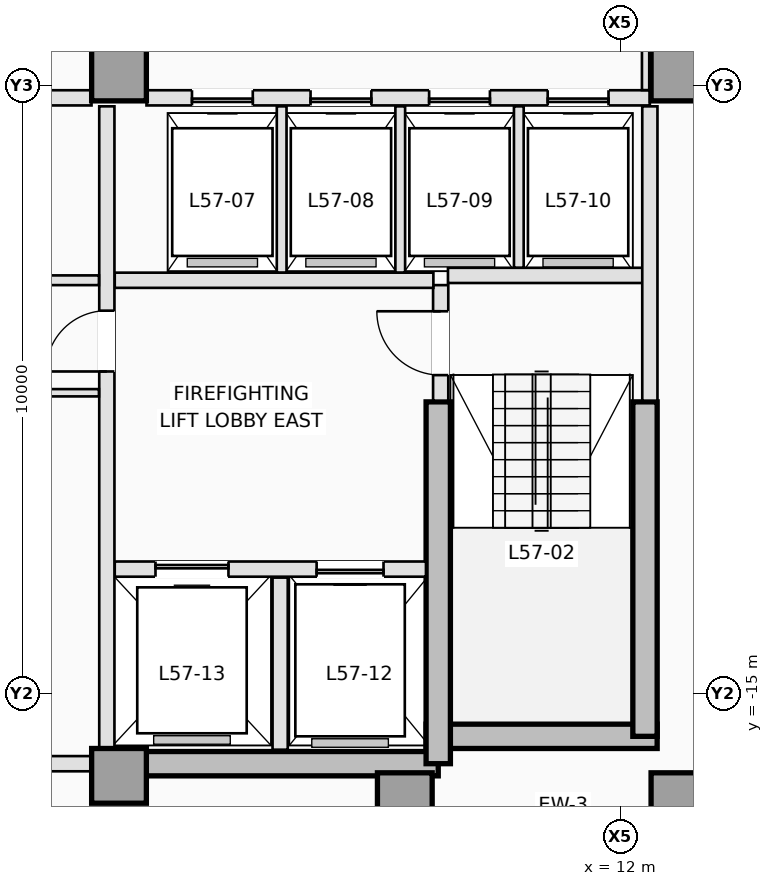
"""IFC4 building model, lengths in metres.
Left out: names, types, materials, properties, quantities, classifications, styles, units other than length and angle.
Written with IfcOpenShell. Run it as: python <this file> out.ifc"""

import sys

from ifc_helpers import new_model, si_unit, direction, frame, frame_2d, origin, origin_2d, place, context, subcontext, project, spatial, rectangle, extrude, element, fill, save


model = new_model("IFC4")
c1 = context("Model", 3, precision=1e-05, world=origin(), true_north=direction((0.0, 1.0)))
c2 = subcontext(c1, "Body", "Model", "MODEL_VIEW")
j1 = project(units=[si_unit("LENGTHUNIT", "METRE"), si_unit("PLANEANGLEUNIT", "RADIAN")], contexts=[c1])
p1 = place(None, origin())
s1 = spatial("IfcSite", under=j1, at=p1, CompositionType="ELEMENT")
p2 = place(p1, origin())
s2 = spatial("IfcBuilding", under=s1, at=p2, CompositionType="ELEMENT")
p3 = place(p2, frame((0.0, 0.0, 207.9)))
s3 = spatial("IfcBuildingStorey", under=s2, at=p3, CompositionType="ELEMENT", Elevation=207.9)
p4 = place(p3, frame((3.75, -16.15, 0.0), z_axis=(0.0, 0.0, 1.0), x_axis=(1.0, 0.0, 0.0)))
e1 = element("IfcWall", 1, at=p4, inside=s3, PredefinedType="SHEAR", context=c2, shape_type="SweptSolid", body=[
    extrude(rectangle(XDim=5.25, YDim=0.4, at=frame_2d((2.625, 0.0))), origin(), (0.0, 0.0, 1.0), 3.5),
])
p5 = place(p3, frame((8.8, -15.7, 0.0), z_axis=(0.0, 0.0, 1.0), x_axis=(1.0, 0.0, 0.0)))
e2 = element("IfcWall", 2, at=p5, inside=s3, PredefinedType="SHEAR", context=c2, shape_type="SweptSolid", body=[
    extrude(rectangle(XDim=3.8, YDim=0.4, at=frame_2d((1.9, 0.0))), origin(), (0.0, 0.0, 1.0), 3.5),
])
p6 = place(p3, frame((12.4, -15.7, 0.0), z_axis=(0.0, 0.0, 1.0), x_axis=(0.0, 1.0, 0.0)))
e3 = element("IfcWall", 3, at=p6, inside=s3, PredefinedType="SHEAR", context=c2, shape_type="SweptSolid", body=[
    extrude(rectangle(XDim=5.5, YDim=0.4, at=frame_2d((2.75, 0.0))), origin(), (0.0, 0.0, 1.0), 3.5),
])
p7 = place(p3, frame((9.0, -16.15, 0.0), z_axis=(0.0, 0.0, 1.0), x_axis=(0.0, 1.0, 0.0)))
e4 = element("IfcWall", 4, at=p7, inside=s3, PredefinedType="SHEAR", context=c2, shape_type="SweptSolid", body=[
    extrude(rectangle(XDim=5.95, YDim=0.4, at=frame_2d((2.975, 0.0))), origin(), (0.0, 0.0, 1.0), 3.5),
])
for number, where, z_axis, x_axis in (
    (5, (3.75, -16.35, 0.0), (0.0, 0.0, 1.0), (1.0, 0.0, 0.0)),
    (6, (8.45, -16.75, 0.0), (0.0, 0.0, 1.0), (1.0, 0.0, 0.0)),
    (7, (12.95, -16.75, 0.0), (0.0, 0.0, 1.0), (1.0, 0.0, 0.0)),
    (8, (3.75, -4.8, 0.0), (0.0, 0.0, 1.0), (1.0, 0.0, 0.0)),
    (9, (12.95, -4.8, 0.0), (0.0, 0.0, 1.0), (1.0, 0.0, 0.0)),
):
    element("IfcColumn", number, at=place(p3, frame(where, z_axis=z_axis, x_axis=x_axis)), inside=s3, PredefinedType="COLUMN", context=c2, shape_type="SweptSolid", body=[
        extrude(rectangle(XDim=0.9, YDim=0.9, at=origin_2d()), origin(), (0.0, 0.0, 1.0), 3.5),
    ])
p8 = place(p3, frame((9.04, -10.18, 0.0), z_axis=(0.0, 0.0, 1.0), x_axis=(0.0, 1.0, 0.0)))
e10 = element("IfcWall", 10, at=p8, inside=s3, PredefinedType="PARTITIONING", context=c2, shape_type="SweptSolid", body=[
    extrude(rectangle(XDim=1.9, YDim=0.25, at=frame_2d((0.95, 0.0))), origin(), (0.0, 0.0, 1.0), 3.25),
])
p9 = place(p8, frame((0.42, 0.0, 0.0)))
e11 = element("IfcOpeningElement", 11, at=p9, cuts=e10, PredefinedType="OPENING", context=c2, shape_type="SweptSolid", body=[
    extrude(rectangle(XDim=1.05, YDim=2.15, at=frame_2d((0.525, 1.075))), frame((0.0, 0.135, 0.0), z_axis=(0.0, -1.0, 0.0), x_axis=(1.0, 0.0, 0.0)), (0.0, 0.0, 1.0), 0.27),
])
p10 = place(p3, frame((9.16, -8.12, 0.0), z_axis=(0.0, 0.0, 1.0), x_axis=(1.0, 0.0, 0.0)))
e12 = element("IfcWall", 12, at=p10, inside=s3, PredefinedType="PARTITIONING", context=c2, shape_type="SweptSolid", body=[
    extrude(rectangle(XDim=3.22, YDim=0.25, at=frame_2d((1.61, 0.0))), origin(), (0.0, 0.0, 1.0), 3.25),
])
p11 = place(p3, frame((12.48, -10.18, 0.0), z_axis=(0.0, 0.0, 1.0), x_axis=(0.0, 1.0, 0.0)))
e13 = element("IfcWall", 13, at=p11, inside=s3, PredefinedType="PARTITIONING", context=c2, shape_type="SweptSolid", body=[
    extrude(rectangle(XDim=4.84, YDim=0.25, at=frame_2d((2.42, 0.0))), origin(), (0.0, 0.0, 1.0), 3.25),
])
p12 = place(p3, frame((3.68, -12.95, 0.0), z_axis=(0.0, 0.0, 1.0), x_axis=(1.0, 0.0, 0.0)))
e14 = element("IfcWall", 14, at=p12, inside=s3, PredefinedType="PARTITIONING", context=c2, shape_type="SweptSolid", body=[
    extrude(rectangle(XDim=5.118, YDim=0.25, at=frame_2d((2.559, 0.0))), origin(), (0.0, 0.0, 1.0), 3.25),
])
p13 = place(p12, frame((3.32, 0.0, 0.0)))
e15 = element("IfcOpeningElement", 15, at=p13, cuts=e14, PredefinedType="OPENING", context=c2, shape_type="SweptSolid", body=[
    extrude(rectangle(XDim=1.1, YDim=2.15, at=frame_2d((0.55, 1.075))), frame((0.0, 0.135, 0.0), z_axis=(0.0, -1.0, 0.0), x_axis=(1.0, 0.0, 0.0)), (0.0, 0.0, 1.0), 0.27),
])
p14 = place(p12, frame((0.67, 0.0, 0.0)))
e16 = element("IfcOpeningElement", 16, at=p14, cuts=e14, PredefinedType="OPENING", context=c2, shape_type="SweptSolid", body=[
    extrude(rectangle(XDim=1.2, YDim=2.15, at=frame_2d((0.6, 1.075))), frame((0.0, 0.135, 0.0), z_axis=(0.0, -1.0, 0.0), x_axis=(1.0, 0.0, 0.0)), (0.0, 0.0, 1.0), 0.27),
])
p15 = place(p3, frame((6.4, -15.92, 0.0), z_axis=(0.0, 0.0, 1.0), x_axis=(0.0, 1.0, 0.0)))
e17 = element("IfcWall", 17, at=p15, inside=s3, PredefinedType="PARTITIONING", context=c2, shape_type="SweptSolid", body=[
    extrude(rectangle(XDim=2.83, YDim=0.25, at=frame_2d((1.415, 0.0))), origin(), (0.0, 0.0, 1.0), 3.25),
])
p16 = place(p3, frame((3.68, -8.2, 0.0), z_axis=(0.0, 0.0, 1.0), x_axis=(1.0, 0.0, 0.0)))
e18 = element("IfcWall", 18, at=p16, inside=s3, PredefinedType="PARTITIONING", context=c2, shape_type="SweptSolid", body=[
    extrude(rectangle(XDim=5.24, YDim=0.25, at=frame_2d((2.62, 0.0))), origin(), (0.0, 0.0, 1.0), 3.25),
])
p17 = place(p3, frame((3.55, -15.898, 0.0), z_axis=(0.0, 0.0, 1.0), x_axis=(0.0, 1.0, 0.0)))
e19 = element("IfcWall", 19, at=p17, inside=s3, PredefinedType="PARTITIONING", context=c2, shape_type="SweptSolid", body=[
    extrude(rectangle(XDim=10.558, YDim=0.25, at=frame_2d((5.279, 0.0))), origin(), (0.0, 0.0, 1.0), 3.25),
])
p18 = place(p17, frame((6.198, 0.0, 0.0)))
e20 = element("IfcOpeningElement", 20, at=p18, cuts=e19, PredefinedType="OPENING", context=c2, shape_type="SweptSolid", body=[
    extrude(rectangle(XDim=1.0, YDim=2.15, at=frame_2d((0.5, 1.075))), frame((0.0, 0.135, 0.0), z_axis=(0.0, -1.0, 0.0), x_axis=(1.0, 0.0, 0.0)), (0.0, 0.0, 1.0), 0.27),
])
p19 = place(p3, frame((4.202, -5.2, 0.0), z_axis=(0.0, 0.0, 1.0), x_axis=(1.0, 0.0, 0.0)))
e21 = element("IfcWall", 21, at=p19, inside=s3, PredefinedType="PARTITIONING", context=c2, shape_type="SweptSolid", body=[
    extrude(rectangle(XDim=8.278, YDim=0.25, at=frame_2d((4.139, 0.0))), origin(), (0.0, 0.0, 1.0), 3.25),
])
p20 = place(p19, frame((0.748, 0.0, 0.0)))
e22 = element("IfcOpeningElement", 22, at=p20, cuts=e21, PredefinedType="OPENING", context=c2, shape_type="SweptSolid", body=[
    extrude(rectangle(XDim=1.0, YDim=2.15, at=frame_2d((0.5, 1.075))), frame((0.0, 0.135, 0.0), z_axis=(0.0, -1.0, 0.0), x_axis=(1.0, 0.0, 0.0)), (0.0, 0.0, 1.0), 0.27),
])
p21 = place(p19, frame((2.698, 0.0, 0.0)))
e23 = element("IfcOpeningElement", 23, at=p21, cuts=e21, PredefinedType="OPENING", context=c2, shape_type="SweptSolid", body=[
    extrude(rectangle(XDim=1.0, YDim=2.15, at=frame_2d((0.5, 1.075))), frame((0.0, 0.135, 0.0), z_axis=(0.0, -1.0, 0.0), x_axis=(1.0, 0.0, 0.0)), (0.0, 0.0, 1.0), 0.27),
])
p22 = place(p19, frame((4.648, 0.0, 0.0)))
e24 = element("IfcOpeningElement", 24, at=p22, cuts=e21, PredefinedType="OPENING", context=c2, shape_type="SweptSolid", body=[
    extrude(rectangle(XDim=1.0, YDim=2.15, at=frame_2d((0.5, 1.075))), frame((0.0, 0.135, 0.0), z_axis=(0.0, -1.0, 0.0), x_axis=(1.0, 0.0, 0.0)), (0.0, 0.0, 1.0), 0.27),
])
p23 = place(p19, frame((6.598, 0.0, 0.0)))
e25 = element("IfcOpeningElement", 25, at=p23, cuts=e21, PredefinedType="OPENING", context=c2, shape_type="SweptSolid", body=[
    extrude(rectangle(XDim=1.0, YDim=2.15, at=frame_2d((0.5, 1.075))), frame((0.0, 0.135, 0.0), z_axis=(0.0, -1.0, 0.0), x_axis=(1.0, 0.0, 0.0)), (0.0, 0.0, 1.0), 0.27),
])
p24 = place(p3, frame((0.95, -5.2, 0.0), z_axis=(0.0, 0.0, 1.0), x_axis=(1.0, 0.0, 0.0)))
e26 = element("IfcWall", 26, at=p24, inside=s3, PredefinedType="PARTITIONING", context=c2, shape_type="SweptSolid", body=[
    extrude(rectangle(XDim=2.348, YDim=0.25, at=frame_2d((1.174, 0.0))), origin(), (0.0, 0.0, 1.0), 3.25),
])
for number, where, z_axis, x_axis in (
    (27, (6.425, -8.073, 0.0), (0.0, 0.0, 1.0), (0.0, 1.0, 0.0)),
    (28, (8.375, -8.073, 0.0), (0.0, 0.0, 1.0), (0.0, 1.0, 0.0)),
):
    element("IfcWall", number, at=place(p3, frame(where, z_axis=z_axis, x_axis=x_axis)), inside=s3, PredefinedType="PARTITIONING", context=c2, shape_type="SweptSolid", body=[
        extrude(rectangle(XDim=2.733, YDim=0.16, at=frame_2d((1.366, 0.0))), origin(), (0.0, 0.0, 1.0), 3.25),
    ])
p25 = place(p3, frame((10.325, -7.993, 0.0), z_axis=(0.0, 0.0, 1.0), x_axis=(0.0, 1.0, 0.0)))
e29 = element("IfcWall", 29, at=p25, inside=s3, PredefinedType="PARTITIONING", context=c2, shape_type="SweptSolid", body=[
    extrude(rectangle(XDim=2.653, YDim=0.16, at=frame_2d((1.326, 0.0))), origin(), (0.0, 0.0, 1.0), 3.25),
])
p26 = place(p3, frame((-3.298, -16.15, 0.0), z_axis=(0.0, 0.0, 1.0), x_axis=(1.0, 0.0, 0.0)))
e30 = element("IfcWall", 30, at=p26, inside=s3, PredefinedType="PARTITIONING", context=c2, shape_type="SweptSolid", body=[
    extrude(rectangle(XDim=6.596, YDim=0.25, at=frame_2d((3.298, 0.0))), origin(), (0.0, 0.0, 1.0), 2.45),
])
p27 = place(p3, frame((-3.42, -8.2, 0.0), z_axis=(0.0, 0.0, 1.0), x_axis=(1.0, 0.0, 0.0)))
e31 = element("IfcWall", 31, at=p27, inside=s3, PredefinedType="PARTITIONING", context=c2, shape_type="SweptSolid", body=[
    extrude(rectangle(XDim=6.84, YDim=0.16, at=frame_2d((3.42, 0.0))), origin(), (0.0, 0.0, 1.0), 3.25),
])
p28 = place(p27, frame((2.92, 0.0, 0.0)))
e32 = element("IfcOpeningElement", 32, at=p28, cuts=e31, PredefinedType="OPENING", context=c2, shape_type="SweptSolid", body=[
    extrude(rectangle(XDim=1.0, YDim=2.15, at=frame_2d((0.5, 1.075))), frame((0.0, 0.09, 0.0), z_axis=(0.0, -1.0, 0.0), x_axis=(1.0, 0.0, 0.0)), (0.0, 0.0, 1.0), 0.18),
])
p29 = place(p3, frame((-3.42, -10.05, 0.0), z_axis=(0.0, 0.0, 1.0), x_axis=(1.0, 0.0, 0.0)))
e33 = element("IfcWall", 33, at=p29, inside=s3, PredefinedType="PARTITIONING", context=c2, shape_type="SweptSolid", body=[
    extrude(rectangle(XDim=6.84, YDim=0.12, at=frame_2d((3.42, 0.0))), origin(), (0.0, 0.0, 1.0), 3.25),
])
p30 = place(p29, frame((0.45, 0.0, 0.0)))
e34 = element("IfcOpeningElement", 34, at=p30, cuts=e33, PredefinedType="OPENING", context=c2, shape_type="SweptSolid", body=[
    extrude(rectangle(XDim=0.88, YDim=2.12, at=frame_2d((0.44, 1.06))), frame((0.0, 0.07, 0.0), z_axis=(0.0, -1.0, 0.0), x_axis=(1.0, 0.0, 0.0)), (0.0, 0.0, 1.0), 0.14),
])
p31 = place(p29, frame((3.6, 0.0, 0.0)))
e35 = element("IfcOpeningElement", 35, at=p31, cuts=e33, PredefinedType="OPENING", context=c2, shape_type="SweptSolid", body=[
    extrude(rectangle(XDim=0.92, YDim=2.12, at=frame_2d((0.46, 1.06))), frame((0.0, 0.07, 0.0), z_axis=(0.0, -1.0, 0.0), x_axis=(1.0, 0.0, 0.0)), (0.0, 0.0, 1.0), 0.14),
])
p32 = place(p3, frame((12.41, -2.462, 0.0), z_axis=(0.0, 0.0, 1.0), x_axis=(0.0, -1.0, 0.0)))
e36 = element("IfcWall", 36, at=p32, inside=s3, PredefinedType="PARTITIONING", context=c2, shape_type="SweptSolid", body=[
    extrude(rectangle(XDim=2.611, YDim=0.12, at=frame_2d((1.306, 0.0))), origin(), (0.0, 0.0, 1.0), 3.25),
])
p33 = place(p20, origin())
e37 = element("IfcDoor", 37, at=p33, inside=s3, OperationType="SLIDING_TO_RIGHT", PredefinedType="DOOR", context=c2, shape_type="SweptSolid", body=[
    extrude(rectangle(XDim=1.0, YDim=2.15, at=frame_2d((0.5, 1.075))), frame((0.0, 0.025, 0.0), z_axis=(0.0, -1.0, 0.0), x_axis=(1.0, 0.0, 0.0)), (0.0, 0.0, 1.0), 0.05),
])
fill(e22, e37)
p34 = place(p21, origin())
e38 = element("IfcDoor", 38, at=p34, inside=s3, OperationType="SLIDING_TO_RIGHT", PredefinedType="DOOR", context=c2, shape_type="SweptSolid", body=[
    extrude(rectangle(XDim=1.0, YDim=2.15, at=frame_2d((0.5, 1.075))), frame((0.0, 0.025, 0.0), z_axis=(0.0, -1.0, 0.0), x_axis=(1.0, 0.0, 0.0)), (0.0, 0.0, 1.0), 0.05),
])
fill(e23, e38)
p35 = place(p22, origin())
e39 = element("IfcDoor", 39, at=p35, inside=s3, OperationType="SLIDING_TO_RIGHT", PredefinedType="DOOR", context=c2, shape_type="SweptSolid", body=[
    extrude(rectangle(XDim=1.0, YDim=2.15, at=frame_2d((0.5, 1.075))), frame((0.0, 0.025, 0.0), z_axis=(0.0, -1.0, 0.0), x_axis=(1.0, 0.0, 0.0)), (0.0, 0.0, 1.0), 0.05),
])
fill(e24, e39)
p36 = place(p23, origin())
e40 = element("IfcDoor", 40, at=p36, inside=s3, OperationType="SLIDING_TO_RIGHT", PredefinedType="DOOR", context=c2, shape_type="SweptSolid", body=[
    extrude(rectangle(XDim=1.0, YDim=2.15, at=frame_2d((0.5, 1.075))), frame((0.0, 0.025, 0.0), z_axis=(0.0, -1.0, 0.0), x_axis=(1.0, 0.0, 0.0)), (0.0, 0.0, 1.0), 0.05),
])
fill(e25, e40)
p37 = place(p13, origin())
e41 = element("IfcDoor", 41, at=p37, inside=s3, OperationType="SLIDING_TO_RIGHT", PredefinedType="DOOR", context=c2, shape_type="SweptSolid", body=[
    extrude(rectangle(XDim=1.1, YDim=2.15, at=frame_2d((0.55, 1.075))), frame((0.0, 0.025, 0.0), z_axis=(0.0, -1.0, 0.0), x_axis=(1.0, 0.0, 0.0)), (0.0, 0.0, 1.0), 0.05),
])
fill(e15, e41)
p38 = place(p14, origin())
e42 = element("IfcDoor", 42, at=p38, inside=s3, OperationType="SLIDING_TO_LEFT", PredefinedType="DOOR", context=c2, shape_type="SweptSolid", body=[
    extrude(rectangle(XDim=1.2, YDim=2.15, at=frame_2d((0.6, 1.075))), frame((0.0, 0.025, 0.0), z_axis=(0.0, -1.0, 0.0), x_axis=(1.0, 0.0, 0.0)), (0.0, 0.0, 1.0), 0.05),
])
fill(e16, e42)
p39 = place(p9, origin())
e43 = element("IfcDoor", 43, at=p39, inside=s3, OperationType="SINGLE_SWING_RIGHT", PredefinedType="DOOR", context=c2, shape_type="SweptSolid", body=[
    extrude(rectangle(XDim=1.05, YDim=2.15, at=frame_2d((0.525, 1.075))), frame((0.0, 0.025, 0.0), z_axis=(0.0, -1.0, 0.0), x_axis=(1.0, 0.0, 0.0)), (0.0, 0.0, 1.0), 0.05),
])
fill(e11, e43)
p40 = place(p18, origin())
e44 = element("IfcDoor", 44, at=p40, inside=s3, OperationType="SINGLE_SWING_LEFT", PredefinedType="DOOR", context=c2, shape_type="SweptSolid", body=[
    extrude(rectangle(XDim=1.0, YDim=2.15, at=frame_2d((0.5, 1.075))), frame((0.0, 0.025, 0.0), z_axis=(0.0, -1.0, 0.0), x_axis=(1.0, 0.0, 0.0)), (0.0, 0.0, 1.0), 0.05),
])
fill(e20, e44)
save(model, sys.argv[1])
